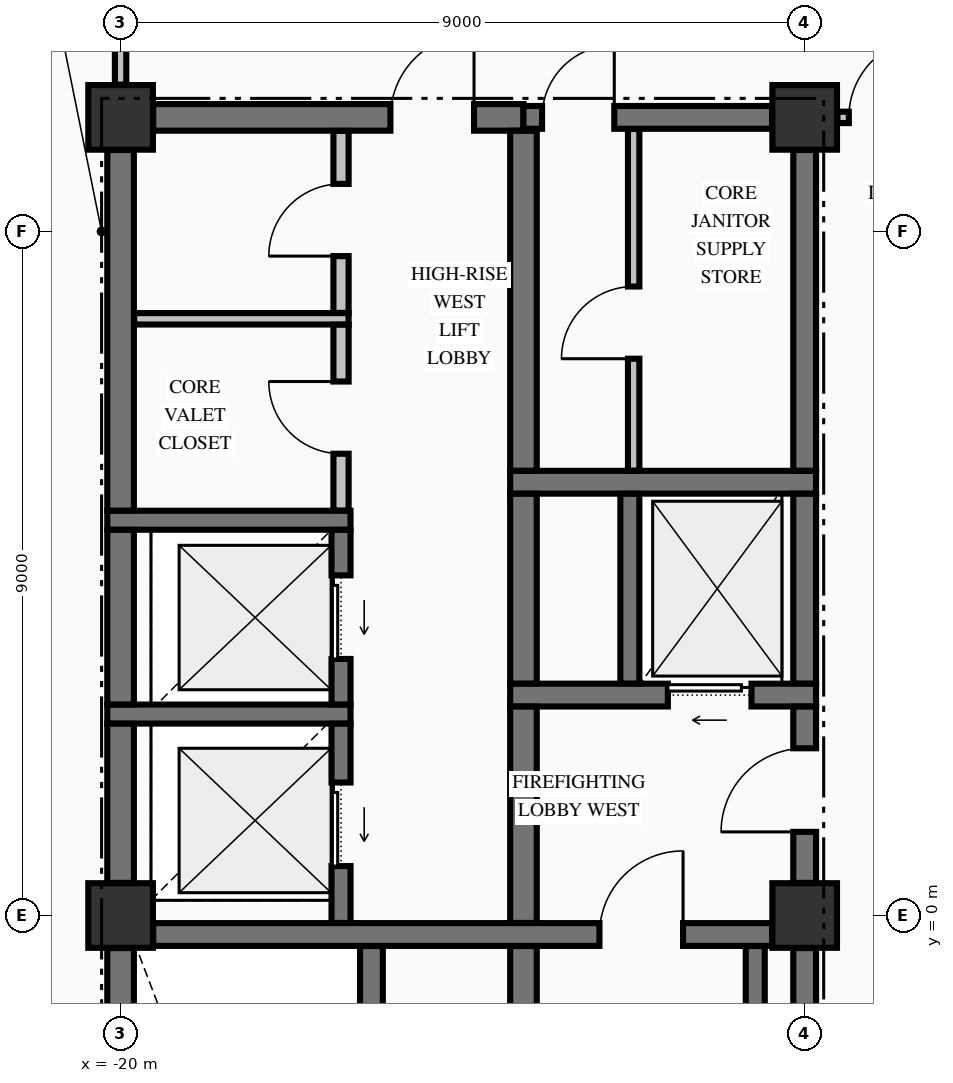
"""IFC4 building model, lengths in metres.
Left out: names, types, materials, properties, quantities, classifications, styles, units other than length and angle.
Written with IfcOpenShell. Run it as: python <this file> out.ifc"""

import sys

from ifc_helpers import new_model, si_unit, direction, frame, frame_2d, origin, origin_2d, place, context, subcontext, project, spatial, rectangle, extrude, element, fill, save


model = new_model("IFC4")
c1 = context("Model", 3, precision=1e-05, world=origin(), true_north=direction((0.0, 1.0)))
c2 = subcontext(c1, "Body", "Model", "MODEL_VIEW")
j1 = project(units=[si_unit("LENGTHUNIT", "METRE"), si_unit("PLANEANGLEUNIT", "RADIAN")], contexts=[c1])
p1 = place(None, origin())
s1 = spatial("IfcSite", under=j1, at=p1, CompositionType="ELEMENT")
p2 = place(p1, origin())
s2 = spatial("IfcBuilding", under=s1, at=p2, CompositionType="ELEMENT")
p3 = place(p2, frame((0.0, 0.0, 169.46)))
s3 = spatial("IfcBuildingStorey", under=s2, at=p3, CompositionType="ELEMENT", Elevation=169.46)
for number, where, z_axis, x_axis in (
    (1, (-20.0, 10.5, -0.25), (0.0, 0.0, 1.0), (1.0, 0.0, 0.0)),
    (2, (-11.0, 0.0, -0.25), (0.0, 0.0, 1.0), (1.0, 0.0, 0.0)),
    (3, (-11.0, 10.5, -0.25), (0.0, 0.0, 1.0), (1.0, 0.0, 0.0)),
    (4, (-20.0, 0.0, -0.25), (0.0, 0.0, 1.0), (1.0, 0.0, 0.0)),
):
    element("IfcColumn", number, at=place(p3, frame(where, z_axis=z_axis, x_axis=x_axis)), inside=s3, PredefinedType="COLUMN", context=c2, shape_type="SweptSolid", body=[
        extrude(rectangle(XDim=0.85, YDim=0.85, at=origin_2d()), origin(), (0.0, 0.0, 1.0), 3.4),
    ])
p4 = place(p3, frame((-19.571, -0.25, 0.0), z_axis=(0.0, 0.0, 1.0), x_axis=(1.0, 0.0, 0.0)))
e5 = element("IfcWall", 5, at=p4, inside=s3, PredefinedType="SHEAR", context=c2, shape_type="SweptSolid", body=[
    extrude(rectangle(XDim=8.142, YDim=0.3, at=frame_2d((4.071, 0.0))), origin(), (0.0, 0.0, 1.0), 3.15),
])
p5 = place(p4, frame((5.871, 0.0, 0.0)))
e6 = element("IfcOpeningElement", 6, at=p5, cuts=e5, PredefinedType="OPENING", context=c2, shape_type="SweptSolid", body=[
    extrude(rectangle(XDim=1.1, YDim=2.15, at=frame_2d((0.55, 1.075))), frame((0.0, 0.16, 0.0), z_axis=(0.0, -1.0, 0.0), x_axis=(1.0, 0.0, 0.0)), (0.0, 0.0, 1.0), 0.32),
])
p6 = place(p3, frame((-20.175, 2.65, 0.0), z_axis=(0.0, 0.0, 1.0), x_axis=(1.0, 0.0, 0.0)))
e7 = element("IfcWall", 7, at=p6, inside=s3, PredefinedType="SOLIDWALL", context=c2, shape_type="SweptSolid", body=[
    extrude(rectangle(XDim=3.2, YDim=0.25, at=frame_2d((1.6, 0.0))), origin(), (0.0, 0.0, 1.0), 3.15),
])
p7 = place(p3, frame((-14.875, 2.9, 0.0), z_axis=(0.0, 0.0, 1.0), x_axis=(1.0, 0.0, 0.0)))
e8 = element("IfcWall", 8, at=p7, inside=s3, PredefinedType="SHEAR", context=c2, shape_type="SweptSolid", body=[
    extrude(rectangle(XDim=4.025, YDim=0.3, at=frame_2d((2.012, 0.0))), origin(), (0.0, 0.0, 1.0), 3.15),
])
p8 = place(p7, frame((2.075, 0.0, 0.0)))
e9 = element("IfcOpeningElement", 9, at=p8, cuts=e8, PredefinedType="OPENING", context=c2, shape_type="SweptSolid", body=[
    extrude(rectangle(XDim=1.1, YDim=2.2, at=frame_2d((0.55, 1.1))), frame((0.0, 0.16, 0.0), z_axis=(0.0, -1.0, 0.0), x_axis=(1.0, 0.0, 0.0)), (0.0, 0.0, 1.0), 0.32),
])
p9 = place(p3, frame((-20.175, 5.2, 0.0), z_axis=(0.0, 0.0, 1.0), x_axis=(1.0, 0.0, 0.0)))
e10 = element("IfcWall", 10, at=p9, inside=s3, PredefinedType="SOLIDWALL", context=c2, shape_type="SweptSolid", body=[
    extrude(rectangle(XDim=3.2, YDim=0.25, at=frame_2d((1.6, 0.0))), origin(), (0.0, 0.0, 1.0), 3.15),
])
p10 = place(p3, frame((-14.875, 5.7, 0.0), z_axis=(0.0, 0.0, 1.0), x_axis=(1.0, 0.0, 0.0)))
e11 = element("IfcWall", 11, at=p10, inside=s3, PredefinedType="SHEAR", context=c2, shape_type="SweptSolid", body=[
    extrude(rectangle(XDim=4.025, YDim=0.3, at=frame_2d((2.012, 0.0))), origin(), (0.0, 0.0, 1.0), 3.15),
])
p11 = place(p3, frame((-19.571, 10.5, 0.0), z_axis=(0.0, 0.0, 1.0), x_axis=(1.0, 0.0, 0.0)))
e12 = element("IfcWall", 12, at=p11, inside=s3, PredefinedType="SHEAR", context=c2, shape_type="SweptSolid", body=[
    extrude(rectangle(XDim=4.871, YDim=0.35, at=frame_2d((2.436, 0.0))), origin(), (0.0, 0.0, 1.0), 3.15),
])
p12 = place(p11, frame((3.121, 0.0, 0.0)))
e13 = element("IfcOpeningElement", 13, at=p12, cuts=e12, PredefinedType="OPENING", context=c2, shape_type="SweptSolid", body=[
    extrude(rectangle(XDim=1.1, YDim=2.15, at=frame_2d((0.55, 1.075))), frame((0.0, 0.185, 0.0), z_axis=(0.0, -1.0, 0.0), x_axis=(1.0, 0.0, 0.0)), (0.0, 0.0, 1.0), 0.37),
])
p13 = place(p3, frame((-14.7, 10.5, 0.0), z_axis=(0.0, 0.0, 1.0), x_axis=(1.0, 0.0, 0.0)))
e14 = element("IfcWall", 14, at=p13, inside=s3, PredefinedType="SHEAR", context=c2, shape_type="SweptSolid", body=[
    extrude(rectangle(XDim=3.271, YDim=0.3, at=frame_2d((1.635, 0.0))), origin(), (0.0, 0.0, 1.0), 3.15),
])
p14 = place(p13, frame((0.245, 0.0, 0.0)))
e15 = element("IfcOpeningElement", 15, at=p14, cuts=e14, PredefinedType="OPENING", context=c2, shape_type="SweptSolid", body=[
    extrude(rectangle(XDim=0.95, YDim=2.15, at=frame_2d((0.475, 1.075))), frame((0.0, 0.16, 0.0), z_axis=(0.0, -1.0, 0.0), x_axis=(1.0, 0.0, 0.0)), (0.0, 0.0, 1.0), 0.32),
])
p15 = place(p3, frame((-19.822, 7.85, 0.0), z_axis=(0.0, 0.0, 1.0), x_axis=(1.0, 0.0, 0.0)))
e16 = element("IfcWall", 16, at=p15, inside=s3, PredefinedType="PARTITIONING", context=c2, shape_type="SweptSolid", body=[
    extrude(rectangle(XDim=2.822, YDim=0.15, at=frame_2d((1.411, 0.0))), origin(), (0.0, 0.0, 1.0), 3.15),
])
p16 = place(p3, frame((-10.569, 10.5, 0.0), z_axis=(0.0, 0.0, 1.0), x_axis=(1.0, 0.0, 0.0)))
e17 = element("IfcWall", 17, at=p16, inside=s3, PredefinedType="PARTITIONING", context=c2, shape_type="SweptSolid", body=[
    extrude(rectangle(XDim=21.138, YDim=0.15, at=frame_2d((10.569, 0.0))), origin(), (0.0, 0.0, 1.0), 3.15),
])
p17 = place(p16, frame((0.15, 0.0, 0.0)))
e18 = element("IfcOpeningElement", 18, at=p17, cuts=e17, PredefinedType="OPENING", context=c2, shape_type="SweptSolid", body=[
    extrude(rectangle(XDim=1.05, YDim=2.15, at=frame_2d((0.525, 1.075))), frame((0.0, 0.085, 0.0), z_axis=(0.0, -1.0, 0.0), x_axis=(1.0, 0.0, 0.0)), (0.0, 0.0, 1.0), 0.17),
])
p18 = place(p16, frame((19.938, 0.0, 0.0)))
e19 = element("IfcOpeningElement", 19, at=p18, cuts=e17, PredefinedType="OPENING", context=c2, shape_type="SweptSolid", body=[
    extrude(rectangle(XDim=1.05, YDim=2.15, at=frame_2d((0.525, 1.075))), frame((0.0, 0.085, 0.0), z_axis=(0.0, -1.0, 0.0), x_axis=(1.0, 0.0, 0.0)), (0.0, 0.0, 1.0), 0.17),
])
p19 = place(p3, frame((-20.0, -9.521, 0.0), z_axis=(0.0, 0.0, 1.0), x_axis=(0.0, 1.0, 0.0)))
e20 = element("IfcWall", 20, at=p19, inside=s3, PredefinedType="SHEAR", context=c2, shape_type="SweptSolid", body=[
    extrude(rectangle(XDim=9.092, YDim=0.35, at=frame_2d((4.546, 0.0))), origin(), (0.0, 0.0, 1.0), 3.15),
])
p20 = place(p3, frame((-20.0, 0.429, 0.0), z_axis=(0.0, 0.0, 1.0), x_axis=(0.0, 1.0, 0.0)))
e21 = element("IfcWall", 21, at=p20, inside=s3, PredefinedType="SHEAR", context=c2, shape_type="SweptSolid", body=[
    extrude(rectangle(XDim=2.094, YDim=0.35, at=frame_2d((1.047, 0.0))), origin(), (0.0, 0.0, 1.0), 3.15),
])
p21 = place(p3, frame((-20.0, 2.777, 0.0), z_axis=(0.0, 0.0, 1.0), x_axis=(0.0, 1.0, 0.0)))
e22 = element("IfcWall", 22, at=p21, inside=s3, PredefinedType="SHEAR", context=c2, shape_type="SweptSolid", body=[
    extrude(rectangle(XDim=2.296, YDim=0.35, at=frame_2d((1.148, 0.0))), origin(), (0.0, 0.0, 1.0), 3.15),
])
p22 = place(p3, frame((-20.0, 5.327, 0.0), z_axis=(0.0, 0.0, 1.0), x_axis=(0.0, 1.0, 0.0)))
e23 = element("IfcWall", 23, at=p22, inside=s3, PredefinedType="SHEAR", context=c2, shape_type="SweptSolid", body=[
    extrude(rectangle(XDim=4.744, YDim=0.35, at=frame_2d((2.372, 0.0))), origin(), (0.0, 0.0, 1.0), 3.15),
])
p23 = place(p3, frame((-17.1, -0.098, 0.0), z_axis=(0.0, 0.0, 1.0), x_axis=(0.0, 1.0, 0.0)))
e24 = element("IfcWall", 24, at=p23, inside=s3, PredefinedType="SOLIDWALL", context=c2, shape_type="SweptSolid", body=[
    extrude(rectangle(XDim=2.621, YDim=0.25, at=frame_2d((1.311, 0.0))), origin(), (0.0, 0.0, 1.0), 3.15),
])
p24 = place(p23, frame((0.748, 0.0, 0.0)))
e25 = element("IfcOpeningElement", 25, at=p24, cuts=e24, PredefinedType="OPENING", context=c2, shape_type="SweptSolid", body=[
    extrude(rectangle(XDim=1.1, YDim=2.2, at=frame_2d((0.55, 1.1))), frame((0.0, 0.135, 0.0), z_axis=(0.0, -1.0, 0.0), x_axis=(1.0, 0.0, 0.0)), (0.0, 0.0, 1.0), 0.27),
])
p25 = place(p3, frame((-17.1, 2.777, 0.0), z_axis=(0.0, 0.0, 1.0), x_axis=(0.0, 1.0, 0.0)))
e26 = element("IfcWall", 26, at=p25, inside=s3, PredefinedType="SOLIDWALL", context=c2, shape_type="SweptSolid", body=[
    extrude(rectangle(XDim=2.296, YDim=0.25, at=frame_2d((1.148, 0.0))), origin(), (0.0, 0.0, 1.0), 3.15),
])
p26 = place(p25, frame((0.598, 0.0, 0.0)))
e27 = element("IfcOpeningElement", 27, at=p26, cuts=e26, PredefinedType="OPENING", context=c2, shape_type="SweptSolid", body=[
    extrude(rectangle(XDim=1.1, YDim=2.2, at=frame_2d((0.55, 1.1))), frame((0.0, 0.135, 0.0), z_axis=(0.0, -1.0, 0.0), x_axis=(1.0, 0.0, 0.0)), (0.0, 0.0, 1.0), 0.27),
])
p27 = place(p3, frame((-16.7, -9.773, 0.0), z_axis=(0.0, 0.0, 1.0), x_axis=(0.0, 1.0, 0.0)))
e28 = element("IfcWall", 28, at=p27, inside=s3, PredefinedType="SHEAR", context=c2, shape_type="SweptSolid", body=[
    extrude(rectangle(XDim=9.371, YDim=0.3, at=frame_2d((4.686, 0.0))), origin(), (0.0, 0.0, 1.0), 3.15),
])
p28 = place(p3, frame((-14.7, -9.773, 0.0), z_axis=(0.0, 0.0, 1.0), x_axis=(0.0, 1.0, 0.0)))
e29 = element("IfcWall", 29, at=p28, inside=s3, PredefinedType="SHEAR", context=c2, shape_type="SweptSolid", body=[
    extrude(rectangle(XDim=9.371, YDim=0.35, at=frame_2d((4.686, 0.0))), origin(), (0.0, 0.0, 1.0), 3.15),
])
p29 = place(p3, frame((-14.7, -0.098, 0.0), z_axis=(0.0, 0.0, 1.0), x_axis=(0.0, 1.0, 0.0)))
e30 = element("IfcWall", 30, at=p29, inside=s3, PredefinedType="SHEAR", context=c2, shape_type="SweptSolid", body=[
    extrude(rectangle(XDim=2.846, YDim=0.35, at=frame_2d((1.423, 0.0))), origin(), (0.0, 0.0, 1.0), 3.15),
])
p30 = place(p3, frame((-14.7, 3.052, 0.0), z_axis=(0.0, 0.0, 1.0), x_axis=(0.0, 1.0, 0.0)))
e31 = element("IfcWall", 31, at=p30, inside=s3, PredefinedType="SHEAR", context=c2, shape_type="SweptSolid", body=[
    extrude(rectangle(XDim=2.496, YDim=0.35, at=frame_2d((1.248, 0.0))), origin(), (0.0, 0.0, 1.0), 3.15),
])
p31 = place(p3, frame((-14.7, 5.852, 0.0), z_axis=(0.0, 0.0, 1.0), x_axis=(0.0, 1.0, 0.0)))
e32 = element("IfcWall", 32, at=p31, inside=s3, PredefinedType="SHEAR", context=c2, shape_type="SweptSolid", body=[
    extrude(rectangle(XDim=4.471, YDim=0.35, at=frame_2d((2.235, 0.0))), origin(), (0.0, 0.0, 1.0), 3.15),
])
p32 = place(p3, frame((-13.3, 3.052, 0.0), z_axis=(0.0, 0.0, 1.0), x_axis=(0.0, 1.0, 0.0)))
e33 = element("IfcWall", 33, at=p32, inside=s3, PredefinedType="SOLIDWALL", context=c2, shape_type="SweptSolid", body=[
    extrude(rectangle(XDim=2.496, YDim=0.25, at=frame_2d((1.248, 0.0))), origin(), (0.0, 0.0, 1.0), 3.15),
])
p33 = place(p3, frame((-11.65, -9.798, 0.0), z_axis=(0.0, 0.0, 1.0), x_axis=(0.0, 1.0, 0.0)))
e34 = element("IfcWall", 34, at=p33, inside=s3, PredefinedType="SOLIDWALL", context=c2, shape_type="SweptSolid", body=[
    extrude(rectangle(XDim=9.396, YDim=0.25, at=frame_2d((4.698, 0.0))), origin(), (0.0, 0.0, 1.0), 3.15),
])
p34 = place(p3, frame((-11.0, -9.521, 0.0), z_axis=(0.0, 0.0, 1.0), x_axis=(0.0, 1.0, 0.0)))
e35 = element("IfcWall", 35, at=p34, inside=s3, PredefinedType="SHEAR", context=c2, shape_type="SweptSolid", body=[
    extrude(rectangle(XDim=9.092, YDim=0.3, at=frame_2d((4.546, 0.0))), origin(), (0.0, 0.0, 1.0), 3.15),
])
p35 = place(p3, frame((-11.0, 0.429, 0.0), z_axis=(0.0, 0.0, 1.0), x_axis=(0.0, 1.0, 0.0)))
e36 = element("IfcWall", 36, at=p35, inside=s3, PredefinedType="SHEAR", context=c2, shape_type="SweptSolid", body=[
    extrude(rectangle(XDim=2.319, YDim=0.3, at=frame_2d((1.16, 0.0))), origin(), (0.0, 0.0, 1.0), 3.15),
])
p36 = place(p35, frame((0.671, 0.0, 0.0)))
e37 = element("IfcOpeningElement", 37, at=p36, cuts=e36, PredefinedType="OPENING", context=c2, shape_type="SweptSolid", body=[
    extrude(rectangle(XDim=1.1, YDim=2.15, at=frame_2d((0.55, 1.075))), frame((0.0, 0.16, 0.0), z_axis=(0.0, -1.0, 0.0), x_axis=(1.0, 0.0, 0.0)), (0.0, 0.0, 1.0), 0.32),
])
p37 = place(p3, frame((-11.0, 3.052, 0.0), z_axis=(0.0, 0.0, 1.0), x_axis=(0.0, 1.0, 0.0)))
e38 = element("IfcWall", 38, at=p37, inside=s3, PredefinedType="SHEAR", context=c2, shape_type="SweptSolid", body=[
    extrude(rectangle(XDim=2.496, YDim=0.3, at=frame_2d((1.248, 0.0))), origin(), (0.0, 0.0, 1.0), 3.15),
])
p38 = place(p3, frame((-11.0, 5.852, 0.0), z_axis=(0.0, 0.0, 1.0), x_axis=(0.0, 1.0, 0.0)))
e39 = element("IfcWall", 39, at=p38, inside=s3, PredefinedType="SHEAR", context=c2, shape_type="SweptSolid", body=[
    extrude(rectangle(XDim=4.219, YDim=0.3, at=frame_2d((2.109, 0.0))), origin(), (0.0, 0.0, 1.0), 3.15),
])
p39 = place(p3, frame((-20.0, 10.931, 0.0), z_axis=(0.0, 0.0, 1.0), x_axis=(0.0, 1.0, 0.0)))
e40 = element("IfcWall", 40, at=p39, inside=s3, PredefinedType="PARTITIONING", context=c2, shape_type="SweptSolid", body=[
    extrude(rectangle(XDim=2.341, YDim=0.15, at=frame_2d((1.17, 0.0))), origin(), (0.0, 0.0, 1.0), 2.342),
])
p40 = place(p3, frame((-17.1, 5.328, 0.0), z_axis=(0.0, 0.0, 1.0), x_axis=(0.0, 1.0, 0.0)))
e41 = element("IfcWall", 41, at=p40, inside=s3, PredefinedType="PARTITIONING", context=c2, shape_type="SweptSolid", body=[
    extrude(rectangle(XDim=2.444, YDim=0.2, at=frame_2d((1.222, 0.0))), origin(), (0.0, 0.0, 1.0), 3.15),
])
p41 = place(p40, frame((0.747, 0.0, 0.0)))
e42 = element("IfcOpeningElement", 42, at=p41, cuts=e41, PredefinedType="OPENING", context=c2, shape_type="SweptSolid", body=[
    extrude(rectangle(XDim=0.95, YDim=2.15, at=frame_2d((0.475, 1.075))), frame((0.0, 0.11, 0.0), z_axis=(0.0, -1.0, 0.0), x_axis=(1.0, 0.0, 0.0)), (0.0, 0.0, 1.0), 0.22),
])
p42 = place(p3, frame((-17.1, 7.928, 0.0), z_axis=(0.0, 0.0, 1.0), x_axis=(0.0, 1.0, 0.0)))
e43 = element("IfcWall", 43, at=p42, inside=s3, PredefinedType="PARTITIONING", context=c2, shape_type="SweptSolid", body=[
    extrude(rectangle(XDim=2.394, YDim=0.2, at=frame_2d((1.197, 0.0))), origin(), (0.0, 0.0, 1.0), 3.15),
])
p43 = place(p42, frame((0.747, 0.0, 0.0)))
e44 = element("IfcOpeningElement", 44, at=p43, cuts=e43, PredefinedType="OPENING", context=c2, shape_type="SweptSolid", body=[
    extrude(rectangle(XDim=0.95, YDim=2.15, at=frame_2d((0.475, 1.075))), frame((0.0, 0.11, 0.0), z_axis=(0.0, -1.0, 0.0), x_axis=(1.0, 0.0, 0.0)), (0.0, 0.0, 1.0), 0.22),
])
p44 = place(p3, frame((-13.25, 5.853, 0.0), z_axis=(0.0, 0.0, 1.0), x_axis=(0.0, 1.0, 0.0)))
e45 = element("IfcWall", 45, at=p44, inside=s3, PredefinedType="PARTITIONING", context=c2, shape_type="SweptSolid", body=[
    extrude(rectangle(XDim=4.494, YDim=0.15, at=frame_2d((2.247, 0.0))), origin(), (0.0, 0.0, 1.0), 3.15),
])
p45 = place(p44, frame((1.472, 0.0, 0.0)))
e46 = element("IfcOpeningElement", 46, at=p45, cuts=e45, PredefinedType="OPENING", context=c2, shape_type="SweptSolid", body=[
    extrude(rectangle(XDim=0.95, YDim=2.15, at=frame_2d((0.475, 1.075))), frame((0.0, 0.085, 0.0), z_axis=(0.0, -1.0, 0.0), x_axis=(1.0, 0.0, 0.0)), (0.0, 0.0, 1.0), 0.17),
])
p46 = place(p5, origin())
e47 = element("IfcDoor", 47, at=p46, inside=s3, OperationType="SINGLE_SWING_RIGHT", PredefinedType="DOOR", context=c2, shape_type="SweptSolid", body=[
    extrude(rectangle(XDim=1.1, YDim=2.15, at=frame_2d((0.55, 1.075))), frame((0.0, 0.025, 0.0), z_axis=(0.0, -1.0, 0.0), x_axis=(1.0, 0.0, 0.0)), (0.0, 0.0, 1.0), 0.05),
])
fill(e6, e47)
p47 = place(p36, origin())
e48 = element("IfcDoor", 48, at=p47, inside=s3, OperationType="SINGLE_SWING_LEFT", PredefinedType="DOOR", context=c2, shape_type="SweptSolid", body=[
    extrude(rectangle(XDim=1.1, YDim=2.15, at=frame_2d((0.55, 1.075))), frame((0.0, 0.025, 0.0), z_axis=(0.0, -1.0, 0.0), x_axis=(1.0, 0.0, 0.0)), (0.0, 0.0, 1.0), 0.05),
])
fill(e37, e48)
p48 = place(p8, origin())
e49 = element("IfcDoor", 49, at=p48, inside=s3, OperationType="SLIDING_TO_LEFT", PredefinedType="DOOR", context=c2, shape_type="SweptSolid", body=[
    extrude(rectangle(XDim=1.1, YDim=2.2, at=frame_2d((0.55, 1.1))), frame((0.0, 0.025, 0.0), z_axis=(0.0, -1.0, 0.0), x_axis=(1.0, 0.0, 0.0)), (0.0, 0.0, 1.0), 0.05),
])
fill(e9, e49)
p49 = place(p14, origin())
e50 = element("IfcDoor", 50, at=p49, inside=s3, OperationType="SINGLE_SWING_RIGHT", PredefinedType="DOOR", context=c2, shape_type="SweptSolid", body=[
    extrude(rectangle(XDim=0.95, YDim=2.15, at=frame_2d((0.475, 1.075))), frame((0.0, 0.025, 0.0), z_axis=(0.0, -1.0, 0.0), x_axis=(1.0, 0.0, 0.0)), (0.0, 0.0, 1.0), 0.05),
])
fill(e15, e50)
p50 = place(p45, origin())
e51 = element("IfcDoor", 51, at=p50, inside=s3, OperationType="SINGLE_SWING_LEFT", PredefinedType="DOOR", context=c2, shape_type="SweptSolid", body=[
    extrude(rectangle(XDim=0.95, YDim=2.15, at=frame_2d((0.475, 1.075))), frame((0.0, 0.025, 0.0), z_axis=(0.0, -1.0, 0.0), x_axis=(1.0, 0.0, 0.0)), (0.0, 0.0, 1.0), 0.05),
])
fill(e46, e51)
p51 = place(p24, origin())
e52 = element("IfcDoor", 52, at=p51, inside=s3, OperationType="SLIDING_TO_LEFT", PredefinedType="DOOR", context=c2, shape_type="SweptSolid", body=[
    extrude(rectangle(XDim=1.1, YDim=2.2, at=frame_2d((0.55, 1.1))), frame((0.0, 0.025, 0.0), z_axis=(0.0, -1.0, 0.0), x_axis=(1.0, 0.0, 0.0)), (0.0, 0.0, 1.0), 0.05),
])
fill(e25, e52)
p52 = place(p26, origin())
e53 = element("IfcDoor", 53, at=p52, inside=s3, OperationType="SLIDING_TO_LEFT", PredefinedType="DOOR", context=c2, shape_type="SweptSolid", body=[
    extrude(rectangle(XDim=1.1, YDim=2.2, at=frame_2d((0.55, 1.1))), frame((0.0, 0.025, 0.0), z_axis=(0.0, -1.0, 0.0), x_axis=(1.0, 0.0, 0.0)), (0.0, 0.0, 1.0), 0.05),
])
fill(e27, e53)
p53 = place(p12, origin())
e54 = element("IfcDoor", 54, at=p53, inside=s3, OperationType="SINGLE_SWING_RIGHT", PredefinedType="DOOR", context=c2, shape_type="SweptSolid", body=[
    extrude(rectangle(XDim=1.1, YDim=2.15, at=frame_2d((0.55, 1.075))), frame((0.0, 0.025, 0.0), z_axis=(0.0, -1.0, 0.0), x_axis=(1.0, 0.0, 0.0)), (0.0, 0.0, 1.0), 0.05),
])
fill(e13, e54)
p54 = place(p43, origin())
e55 = element("IfcDoor", 55, at=p54, inside=s3, OperationType="SINGLE_SWING_LEFT", PredefinedType="DOOR", context=c2, shape_type="SweptSolid", body=[
    extrude(rectangle(XDim=0.95, YDim=2.15, at=frame_2d((0.475, 1.075))), frame((0.0, 0.025, 0.0), z_axis=(0.0, -1.0, 0.0), x_axis=(1.0, 0.0, 0.0)), (0.0, 0.0, 1.0), 0.05),
])
fill(e44, e55)
p55 = place(p41, origin())
e56 = element("IfcDoor", 56, at=p55, inside=s3, OperationType="SINGLE_SWING_RIGHT", PredefinedType="DOOR", context=c2, shape_type="SweptSolid", body=[
    extrude(rectangle(XDim=0.95, YDim=2.15, at=frame_2d((0.475, 1.075))), frame((0.0, 0.025, 0.0), z_axis=(0.0, -1.0, 0.0), x_axis=(1.0, 0.0, 0.0)), (0.0, 0.0, 1.0), 0.05),
])
fill(e42, e56)
p56 = place(p17, origin())
e57 = element("IfcDoor", 57, at=p56, inside=s3, OperationType="SINGLE_SWING_RIGHT", PredefinedType="DOOR", context=c2, shape_type="SweptSolid", body=[
    extrude(rectangle(XDim=1.05, YDim=2.15, at=frame_2d((0.525, 1.075))), frame((0.0, 0.025, 0.0), z_axis=(0.0, -1.0, 0.0), x_axis=(1.0, 0.0, 0.0)), (0.0, 0.0, 1.0), 0.05),
])
fill(e18, e57)
save(model, sys.argv[1])
